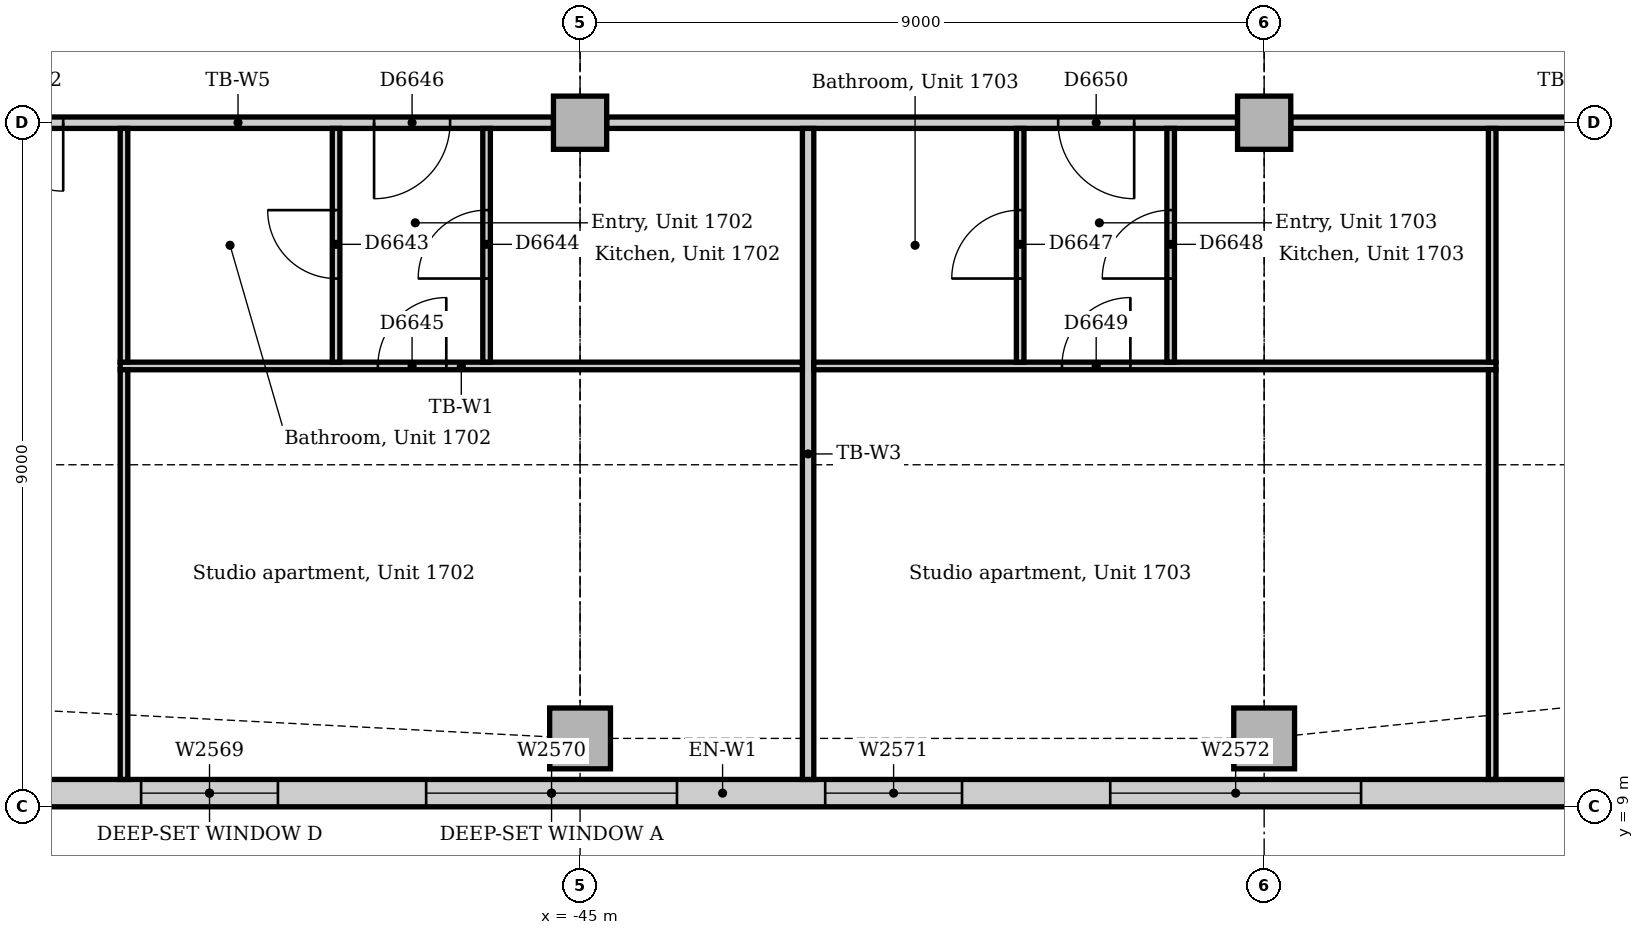
"""IFC4 building model, lengths in metres.
Left out: names, types, materials, properties, quantities, classifications, styles, units other than length and angle.
Written with IfcOpenShell. Run it as: python <this file> out.ifc"""

import sys

from ifc_helpers import new_model, si_unit, direction, frame, frame_2d, origin, origin_2d, place, context, subcontext, project, spatial, rectangle, extrude, element, fill, save


model = new_model("IFC4")
c1 = context("Model", 3, precision=1e-05, world=origin(), true_north=direction((0.0, 1.0)))
c2 = subcontext(c1, "Body", "Model", "MODEL_VIEW")
j1 = project(units=[si_unit("LENGTHUNIT", "METRE"), si_unit("PLANEANGLEUNIT", "RADIAN")], contexts=[c1])
p1 = place(None, origin())
s1 = spatial("IfcSite", under=j1, at=p1, CompositionType="ELEMENT")
p2 = place(p1, origin())
s2 = spatial("IfcBuilding", under=s1, at=p2, CompositionType="ELEMENT")
p3 = place(p2, frame((0.0, 0.0, 75.0)))
s3 = spatial("IfcBuildingStorey", under=s2, at=p3, CompositionType="ELEMENT", Elevation=75.0)
for number, where, z_axis, x_axis in (
    (1, (-45.0, 9.9, 0.0), (0.0, 0.0, 1.0), (1.0, 0.0, 0.0)),
    (2, (-36.0, 9.9, 0.0), (0.0, 0.0, 1.0), (1.0, 0.0, 0.0)),
):
    element("IfcColumn", number, at=place(p3, frame(where, z_axis=z_axis, x_axis=x_axis)), inside=s3, PredefinedType="COLUMN", context=c2, shape_type="SweptSolid", body=[
        extrude(rectangle(XDim=0.8, YDim=0.8, at=origin_2d()), origin(), (0.0, 0.0, 1.0), 3.85),
    ])
for number, where, z_axis, x_axis in (
    (3, (-45.0, 18.0, 0.0), (0.0, 0.0, 1.0), (1.0, 0.0, 0.0)),
    (4, (-36.0, 18.0, 0.0), (0.0, 0.0, 1.0), (1.0, 0.0, 0.0)),
):
    element("IfcColumn", number, at=place(p3, frame(where, z_axis=z_axis, x_axis=x_axis)), inside=s3, PredefinedType="COLUMN", context=c2, shape_type="SweptSolid", body=[
        extrude(rectangle(XDim=0.7, YDim=0.7, at=origin_2d()), origin(), (0.0, 0.0, 1.0), 3.85),
    ])
p4 = place(p3, frame((-55.007, 9.18, 0.0), z_axis=(0.0, 0.0, 1.0), x_axis=(1.0, 0.0, 0.0)))
e5 = element("IfcWall", 5, at=p4, inside=s3, PredefinedType="STANDARD", context=c2, shape_type="SweptSolid", body=[
    extrude(rectangle(XDim=23.765, YDim=0.36, at=frame_2d((11.882, 0.0))), origin(), (0.0, 0.0, 1.0), 3.85),
])
p5 = place(p4, frame((4.232, 0.0, 0.9)))
e6 = element("IfcOpeningElement", 6, at=p5, cuts=e5, PredefinedType="OPENING", context=c2, shape_type="SweptSolid", body=[
    extrude(rectangle(XDim=1.8, YDim=1.6, at=frame_2d((0.9, 0.8))), frame((0.0, 0.19, 0.0), z_axis=(0.0, -1.0, 0.0), x_axis=(1.0, 0.0, 0.0)), (0.0, 0.0, 1.0), 0.38),
])
p6 = place(p4, frame((7.982, 0.0, 0.9)))
e7 = element("IfcOpeningElement", 7, at=p6, cuts=e5, PredefinedType="OPENING", context=c2, shape_type="SweptSolid", body=[
    extrude(rectangle(XDim=3.3, YDim=1.6, at=frame_2d((1.65, 0.8))), frame((0.0, 0.19, 0.0), z_axis=(0.0, -1.0, 0.0), x_axis=(1.0, 0.0, 0.0)), (0.0, 0.0, 1.0), 0.38),
])
p7 = place(p4, frame((13.232, 0.0, 0.9)))
e8 = element("IfcOpeningElement", 8, at=p7, cuts=e5, PredefinedType="OPENING", context=c2, shape_type="SweptSolid", body=[
    extrude(rectangle(XDim=1.8, YDim=1.6, at=frame_2d((0.9, 0.8))), frame((0.0, 0.19, 0.0), z_axis=(0.0, -1.0, 0.0), x_axis=(1.0, 0.0, 0.0)), (0.0, 0.0, 1.0), 0.38),
])
p8 = place(p4, frame((16.982, 0.0, 0.9)))
e9 = element("IfcOpeningElement", 9, at=p8, cuts=e5, PredefinedType="OPENING", context=c2, shape_type="SweptSolid", body=[
    extrude(rectangle(XDim=3.3, YDim=1.6, at=frame_2d((1.65, 0.8))), frame((0.0, 0.19, 0.0), z_axis=(0.0, -1.0, 0.0), x_axis=(1.0, 0.0, 0.0)), (0.0, 0.0, 1.0), 0.38),
])
p9 = place(p3, frame((-35.65, 18.0, 0.0), z_axis=(0.0, 0.0, 1.0), x_axis=(1.0, 0.0, 0.0)))
e10 = element("IfcWall", 10, at=p9, inside=s3, PredefinedType="PARTITIONING", context=c2, shape_type="SweptSolid", body=[
    extrude(rectangle(XDim=7.35, YDim=0.15, at=frame_2d((3.675, 0.0))), origin(), (0.0, 0.0, 1.0), 3.158),
])
p10 = place(p9, frame((4.45, 0.0, 0.0)))
e11 = element("IfcOpeningElement", 11, at=p10, cuts=e10, PredefinedType="OPENING", context=c2, shape_type="SweptSolid", body=[
    extrude(rectangle(XDim=0.9, YDim=2.1, at=frame_2d((0.45, 1.05))), frame((0.0, 0.085, 0.0), z_axis=(0.0, -1.0, 0.0), x_axis=(1.0, 0.0, 0.0)), (0.0, 0.0, 1.0), 0.17),
])
p11 = place(p3, frame((-44.65, 18.0, 0.0), z_axis=(0.0, 0.0, 1.0), x_axis=(1.0, 0.0, 0.0)))
e12 = element("IfcWall", 12, at=p11, inside=s3, PredefinedType="PARTITIONING", context=c2, shape_type="SweptSolid", body=[
    extrude(rectangle(XDim=8.3, YDim=0.15, at=frame_2d((4.15, 0.0))), origin(), (0.0, 0.0, 1.0), 3.158),
])
p12 = place(p11, frame((5.94, 0.0, 0.0)))
e13 = element("IfcOpeningElement", 13, at=p12, cuts=e12, PredefinedType="OPENING", context=c2, shape_type="SweptSolid", body=[
    extrude(rectangle(XDim=1.0, YDim=2.1, at=frame_2d((0.5, 1.05))), frame((0.0, 0.085, 0.0), z_axis=(0.0, -1.0, 0.0), x_axis=(1.0, 0.0, 0.0)), (0.0, 0.0, 1.0), 0.17),
])
p13 = place(p3, frame((-53.65, 18.0, 0.0), z_axis=(0.0, 0.0, 1.0), x_axis=(1.0, 0.0, 0.0)))
e14 = element("IfcWall", 14, at=p13, inside=s3, PredefinedType="PARTITIONING", context=c2, shape_type="SweptSolid", body=[
    extrude(rectangle(XDim=8.3, YDim=0.15, at=frame_2d((4.15, 0.0))), origin(), (0.0, 0.0, 1.0), 3.158),
])
p14 = place(p13, frame((0.95, 0.0, 0.0)))
e15 = element("IfcOpeningElement", 15, at=p14, cuts=e14, PredefinedType="OPENING", context=c2, shape_type="SweptSolid", body=[
    extrude(rectangle(XDim=0.9, YDim=2.1, at=frame_2d((0.45, 1.05))), frame((0.0, 0.085, 0.0), z_axis=(0.0, -1.0, 0.0), x_axis=(1.0, 0.0, 0.0)), (0.0, 0.0, 1.0), 0.17),
])
p15 = place(p13, frame((5.94, 0.0, 0.0)))
e16 = element("IfcOpeningElement", 16, at=p15, cuts=e14, PredefinedType="OPENING", context=c2, shape_type="SweptSolid", body=[
    extrude(rectangle(XDim=1.0, YDim=2.1, at=frame_2d((0.5, 1.05))), frame((0.0, 0.085, 0.0), z_axis=(0.0, -1.0, 0.0), x_axis=(1.0, 0.0, 0.0)), (0.0, 0.0, 1.0), 0.17),
])
p16 = place(p3, frame((-42.0, 9.36, 0.0), z_axis=(0.0, 0.0, 1.0), x_axis=(0.0, 1.0, 0.0)))
e17 = element("IfcWall", 17, at=p16, inside=s3, PredefinedType="PARTITIONING", context=c2, shape_type="SweptSolid", body=[
    extrude(rectangle(XDim=8.565, YDim=0.15, at=frame_2d((4.282, 0.0))), origin(), (0.0, 0.0, 1.0), 3.85),
])
p17 = place(p3, frame((-51.05, 14.8, 0.0), z_axis=(0.0, 0.0, 1.0), x_axis=(1.0, 0.0, 0.0)))
e18 = element("IfcWall", 18, at=p17, inside=s3, PredefinedType="PARTITIONING", context=c2, shape_type="SweptSolid", body=[
    extrude(rectangle(XDim=8.975, YDim=0.1, at=frame_2d((4.487, 0.0))), origin(), (0.0, 0.0, 1.0), 3.85),
])
p18 = place(p17, frame((3.39, 0.0, 0.0)))
e19 = element("IfcOpeningElement", 19, at=p18, cuts=e18, PredefinedType="OPENING", context=c2, shape_type="SweptSolid", body=[
    extrude(rectangle(XDim=0.9, YDim=2.1, at=frame_2d((0.45, 1.05))), frame((0.0, 0.06, 0.0), z_axis=(0.0, -1.0, 0.0), x_axis=(1.0, 0.0, 0.0)), (0.0, 0.0, 1.0), 0.12),
])
p19 = place(p3, frame((-41.925, 14.8, 0.0), z_axis=(0.0, 0.0, 1.0), x_axis=(1.0, 0.0, 0.0)))
e20 = element("IfcWall", 20, at=p19, inside=s3, PredefinedType="PARTITIONING", context=c2, shape_type="SweptSolid", body=[
    extrude(rectangle(XDim=8.975, YDim=0.1, at=frame_2d((4.487, 0.0))), origin(), (0.0, 0.0, 1.0), 3.85),
])
p20 = place(p19, frame((3.265, 0.0, 0.0)))
e21 = element("IfcOpeningElement", 21, at=p20, cuts=e20, PredefinedType="OPENING", context=c2, shape_type="SweptSolid", body=[
    extrude(rectangle(XDim=0.9, YDim=2.1, at=frame_2d((0.45, 1.05))), frame((0.0, 0.06, 0.0), z_axis=(0.0, -1.0, 0.0), x_axis=(1.0, 0.0, 0.0)), (0.0, 0.0, 1.0), 0.12),
])
p21 = place(p3, frame((-51.0, 14.85, 0.0), z_axis=(0.0, 0.0, 1.0), x_axis=(0.0, 1.0, 0.0)))
e22 = element("IfcWall", 22, at=p21, inside=s3, PredefinedType="PARTITIONING", context=c2, shape_type="SweptSolid", body=[
    extrude(rectangle(XDim=3.075, YDim=0.1, at=frame_2d((1.538, 0.0))), origin(), (0.0, 0.0, 1.0), 3.85),
])
p22 = place(p3, frame((-51.0, 9.36, 0.0), z_axis=(0.0, 0.0, 1.0), x_axis=(0.0, 1.0, 0.0)))
e23 = element("IfcWall", 23, at=p22, inside=s3, PredefinedType="PARTITIONING", context=c2, shape_type="SweptSolid", body=[
    extrude(rectangle(XDim=5.39, YDim=0.1, at=frame_2d((2.695, 0.0))), origin(), (0.0, 0.0, 1.0), 3.85),
])
p23 = place(p3, frame((-33.0, 14.85, 0.0), z_axis=(0.0, 0.0, 1.0), x_axis=(0.0, 1.0, 0.0)))
e24 = element("IfcWall", 24, at=p23, inside=s3, PredefinedType="PARTITIONING", context=c2, shape_type="SweptSolid", body=[
    extrude(rectangle(XDim=3.075, YDim=0.1, at=frame_2d((1.538, 0.0))), origin(), (0.0, 0.0, 1.0), 3.85),
])
p24 = place(p3, frame((-33.0, 9.36, 0.0), z_axis=(0.0, 0.0, 1.0), x_axis=(0.0, 1.0, 0.0)))
e25 = element("IfcWall", 25, at=p24, inside=s3, PredefinedType="PARTITIONING", context=c2, shape_type="SweptSolid", body=[
    extrude(rectangle(XDim=5.39, YDim=0.1, at=frame_2d((2.695, 0.0))), origin(), (0.0, 0.0, 1.0), 3.85),
])
p25 = place(p3, frame((-48.21, 14.85, 0.0), z_axis=(0.0, 0.0, 1.0), x_axis=(0.0, 1.0, 0.0)))
e26 = element("IfcWall", 26, at=p25, inside=s3, PredefinedType="PARTITIONING", context=c2, shape_type="SweptSolid", body=[
    extrude(rectangle(XDim=3.075, YDim=0.1, at=frame_2d((1.538, 0.0))), origin(), (0.0, 0.0, 1.0), 3.85),
])
p26 = place(p25, frame((1.1, 0.0, 0.0)))
e27 = element("IfcOpeningElement", 27, at=p26, cuts=e26, PredefinedType="OPENING", context=c2, shape_type="SweptSolid", body=[
    extrude(rectangle(XDim=0.9, YDim=2.1, at=frame_2d((0.45, 1.05))), frame((0.0, 0.06, 0.0), z_axis=(0.0, -1.0, 0.0), x_axis=(1.0, 0.0, 0.0)), (0.0, 0.0, 1.0), 0.12),
])
p27 = place(p3, frame((-46.23, 14.85, 0.0), z_axis=(0.0, 0.0, 1.0), x_axis=(0.0, 1.0, 0.0)))
e28 = element("IfcWall", 28, at=p27, inside=s3, PredefinedType="PARTITIONING", context=c2, shape_type="SweptSolid", body=[
    extrude(rectangle(XDim=3.075, YDim=0.1, at=frame_2d((1.538, 0.0))), origin(), (0.0, 0.0, 1.0), 3.85),
])
p28 = place(p27, frame((1.1, 0.0, 0.0)))
e29 = element("IfcOpeningElement", 29, at=p28, cuts=e28, PredefinedType="OPENING", context=c2, shape_type="SweptSolid", body=[
    extrude(rectangle(XDim=0.9, YDim=2.1, at=frame_2d((0.45, 1.05))), frame((0.0, 0.06, 0.0), z_axis=(0.0, -1.0, 0.0), x_axis=(1.0, 0.0, 0.0)), (0.0, 0.0, 1.0), 0.12),
])
p29 = place(p3, frame((-39.21, 14.85, 0.0), z_axis=(0.0, 0.0, 1.0), x_axis=(0.0, 1.0, 0.0)))
e30 = element("IfcWall", 30, at=p29, inside=s3, PredefinedType="PARTITIONING", context=c2, shape_type="SweptSolid", body=[
    extrude(rectangle(XDim=3.075, YDim=0.1, at=frame_2d((1.538, 0.0))), origin(), (0.0, 0.0, 1.0), 3.85),
])
p30 = place(p29, frame((1.1, 0.0, 0.0)))
e31 = element("IfcOpeningElement", 31, at=p30, cuts=e30, PredefinedType="OPENING", context=c2, shape_type="SweptSolid", body=[
    extrude(rectangle(XDim=0.9, YDim=2.1, at=frame_2d((0.45, 1.05))), frame((0.0, 0.06, 0.0), z_axis=(0.0, -1.0, 0.0), x_axis=(1.0, 0.0, 0.0)), (0.0, 0.0, 1.0), 0.12),
])
p31 = place(p3, frame((-37.23, 14.85, 0.0), z_axis=(0.0, 0.0, 1.0), x_axis=(0.0, 1.0, 0.0)))
e32 = element("IfcWall", 32, at=p31, inside=s3, PredefinedType="PARTITIONING", context=c2, shape_type="SweptSolid", body=[
    extrude(rectangle(XDim=3.075, YDim=0.1, at=frame_2d((1.538, 0.0))), origin(), (0.0, 0.0, 1.0), 3.85),
])
p32 = place(p31, frame((1.1, 0.0, 0.0)))
e33 = element("IfcOpeningElement", 33, at=p32, cuts=e32, PredefinedType="OPENING", context=c2, shape_type="SweptSolid", body=[
    extrude(rectangle(XDim=0.9, YDim=2.1, at=frame_2d((0.45, 1.05))), frame((0.0, 0.06, 0.0), z_axis=(0.0, -1.0, 0.0), x_axis=(1.0, 0.0, 0.0)), (0.0, 0.0, 1.0), 0.12),
])
p33 = place(p5, origin())
e34 = element("IfcWindow", 34, at=p33, inside=s3, PartitioningType="SINGLE_PANEL", PredefinedType="WINDOW", context=c2, shape_type="SweptSolid", body=[
    extrude(rectangle(XDim=1.8, YDim=1.6, at=frame_2d((0.9, 0.8))), frame((0.0, 0.13, 0.0), z_axis=(0.0, -1.0, 0.0), x_axis=(1.0, 0.0, 0.0)), (0.0, 0.0, 1.0), 0.06),
])
fill(e6, e34)
p34 = place(p6, origin())
e35 = element("IfcWindow", 35, at=p34, inside=s3, PartitioningType="SINGLE_PANEL", PredefinedType="WINDOW", context=c2, shape_type="SweptSolid", body=[
    extrude(rectangle(XDim=3.3, YDim=1.6, at=frame_2d((1.65, 0.8))), frame((0.0, 0.13, 0.0), z_axis=(0.0, -1.0, 0.0), x_axis=(1.0, 0.0, 0.0)), (0.0, 0.0, 1.0), 0.06),
])
fill(e7, e35)
p35 = place(p7, origin())
e36 = element("IfcWindow", 36, at=p35, inside=s3, PartitioningType="SINGLE_PANEL", PredefinedType="WINDOW", context=c2, shape_type="SweptSolid", body=[
    extrude(rectangle(XDim=1.8, YDim=1.6, at=frame_2d((0.9, 0.8))), frame((0.0, 0.13, 0.0), z_axis=(0.0, -1.0, 0.0), x_axis=(1.0, 0.0, 0.0)), (0.0, 0.0, 1.0), 0.06),
])
fill(e8, e36)
p36 = place(p8, origin())
e37 = element("IfcWindow", 37, at=p36, inside=s3, PartitioningType="SINGLE_PANEL", PredefinedType="WINDOW", context=c2, shape_type="SweptSolid", body=[
    extrude(rectangle(XDim=3.3, YDim=1.6, at=frame_2d((1.65, 0.8))), frame((0.0, 0.13, 0.0), z_axis=(0.0, -1.0, 0.0), x_axis=(1.0, 0.0, 0.0)), (0.0, 0.0, 1.0), 0.06),
])
fill(e9, e37)
p37 = place(p14, frame((0.9, 0.0, 0.0), z_axis=(0.0, 0.0, 1.0), x_axis=(-1.0, 0.0, 0.0)))
e38 = element("IfcDoor", 38, at=p37, inside=s3, OperationType="SINGLE_SWING_LEFT", PredefinedType="DOOR", context=c2, shape_type="SweptSolid", body=[
    extrude(rectangle(XDim=0.9, YDim=2.1, at=frame_2d((0.45, 1.05))), frame((0.0, 0.025, 0.0), z_axis=(0.0, -1.0, 0.0), x_axis=(1.0, 0.0, 0.0)), (0.0, 0.0, 1.0), 0.05),
])
fill(e15, e38)
p38 = place(p26, origin())
e39 = element("IfcDoor", 39, at=p38, inside=s3, OperationType="SINGLE_SWING_RIGHT", PredefinedType="DOOR", context=c2, shape_type="SweptSolid", body=[
    extrude(rectangle(XDim=0.9, YDim=2.1, at=frame_2d((0.45, 1.05))), frame((0.0, 0.025, 0.0), z_axis=(0.0, -1.0, 0.0), x_axis=(1.0, 0.0, 0.0)), (0.0, 0.0, 1.0), 0.05),
])
fill(e27, e39)
p39 = place(p28, origin())
e40 = element("IfcDoor", 40, at=p39, inside=s3, OperationType="SINGLE_SWING_LEFT", PredefinedType="DOOR", context=c2, shape_type="SweptSolid", body=[
    extrude(rectangle(XDim=0.9, YDim=2.1, at=frame_2d((0.45, 1.05))), frame((0.0, 0.025, 0.0), z_axis=(0.0, -1.0, 0.0), x_axis=(1.0, 0.0, 0.0)), (0.0, 0.0, 1.0), 0.05),
])
fill(e29, e40)
p40 = place(p18, origin())
e41 = element("IfcDoor", 41, at=p40, inside=s3, OperationType="SINGLE_SWING_RIGHT", PredefinedType="DOOR", context=c2, shape_type="SweptSolid", body=[
    extrude(rectangle(XDim=0.9, YDim=2.1, at=frame_2d((0.45, 1.05))), frame((0.0, 0.025, 0.0), z_axis=(0.0, -1.0, 0.0), x_axis=(1.0, 0.0, 0.0)), (0.0, 0.0, 1.0), 0.05),
])
fill(e19, e41)
p41 = place(p15, frame((1.0, 0.0, 0.0), z_axis=(0.0, 0.0, 1.0), x_axis=(-1.0, 0.0, 0.0)))
e42 = element("IfcDoor", 42, at=p41, inside=s3, OperationType="SINGLE_SWING_RIGHT", PredefinedType="DOOR", context=c2, shape_type="SweptSolid", body=[
    extrude(rectangle(XDim=1.0, YDim=2.1, at=frame_2d((0.5, 1.05))), frame((0.0, 0.025, 0.0), z_axis=(0.0, -1.0, 0.0), x_axis=(1.0, 0.0, 0.0)), (0.0, 0.0, 1.0), 0.05),
])
fill(e16, e42)
p42 = place(p30, origin())
e43 = element("IfcDoor", 43, at=p42, inside=s3, OperationType="SINGLE_SWING_LEFT", PredefinedType="DOOR", context=c2, shape_type="SweptSolid", body=[
    extrude(rectangle(XDim=0.9, YDim=2.1, at=frame_2d((0.45, 1.05))), frame((0.0, 0.025, 0.0), z_axis=(0.0, -1.0, 0.0), x_axis=(1.0, 0.0, 0.0)), (0.0, 0.0, 1.0), 0.05),
])
fill(e31, e43)
p43 = place(p32, origin())
e44 = element("IfcDoor", 44, at=p43, inside=s3, OperationType="SINGLE_SWING_LEFT", PredefinedType="DOOR", context=c2, shape_type="SweptSolid", body=[
    extrude(rectangle(XDim=0.9, YDim=2.1, at=frame_2d((0.45, 1.05))), frame((0.0, 0.025, 0.0), z_axis=(0.0, -1.0, 0.0), x_axis=(1.0, 0.0, 0.0)), (0.0, 0.0, 1.0), 0.05),
])
fill(e33, e44)
p44 = place(p20, origin())
e45 = element("IfcDoor", 45, at=p44, inside=s3, OperationType="SINGLE_SWING_RIGHT", PredefinedType="DOOR", context=c2, shape_type="SweptSolid", body=[
    extrude(rectangle(XDim=0.9, YDim=2.1, at=frame_2d((0.45, 1.05))), frame((0.0, 0.025, 0.0), z_axis=(0.0, -1.0, 0.0), x_axis=(1.0, 0.0, 0.0)), (0.0, 0.0, 1.0), 0.05),
])
fill(e21, e45)
p45 = place(p12, frame((1.0, 0.0, 0.0), z_axis=(0.0, 0.0, 1.0), x_axis=(-1.0, 0.0, 0.0)))
e46 = element("IfcDoor", 46, at=p45, inside=s3, OperationType="SINGLE_SWING_LEFT", PredefinedType="DOOR", context=c2, shape_type="SweptSolid", body=[
    extrude(rectangle(XDim=1.0, YDim=2.1, at=frame_2d((0.5, 1.05))), frame((0.0, 0.025, 0.0), z_axis=(0.0, -1.0, 0.0), x_axis=(1.0, 0.0, 0.0)), (0.0, 0.0, 1.0), 0.05),
])
fill(e13, e46)
save(model, sys.argv[1])
